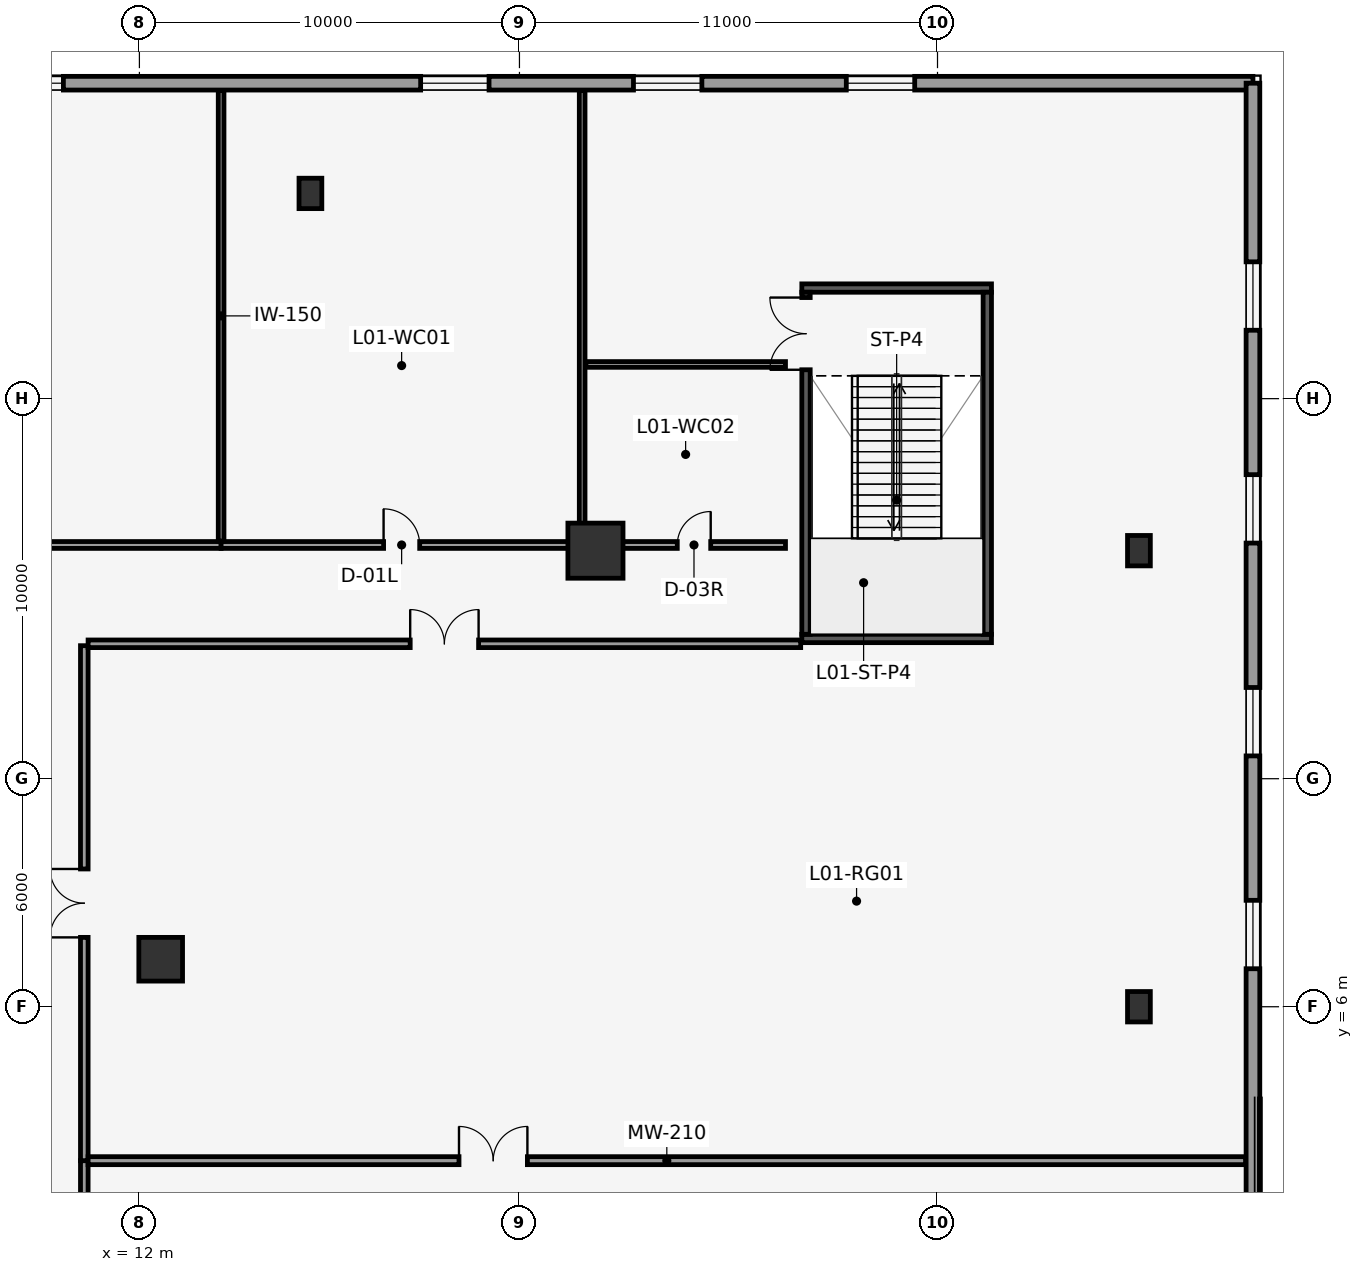
"""IFC4 building model, lengths in metres.
Left out: names, types, materials, properties, quantities, classifications, styles, units other than length and angle.
Written with IfcOpenShell. Run it as: python <this file> out.ifc"""

import sys

from ifc_helpers import new_model, si_unit, direction, frame, frame_2d, origin, origin_2d, place, context, subcontext, project, spatial, rectangle, hollow_rectangle, extrude, element, fill, save


model = new_model("IFC4")
c1 = context("Model", 3, precision=1e-05, world=origin(), true_north=direction((0.0, 1.0)))
c2 = subcontext(c1, "Body", "Model", "MODEL_VIEW")
j1 = project(units=[si_unit("LENGTHUNIT", "METRE"), si_unit("PLANEANGLEUNIT", "RADIAN")], contexts=[c1])
p1 = place(None, origin())
s1 = spatial("IfcSite", under=j1, at=p1, CompositionType="ELEMENT")
p2 = place(p1, origin())
s2 = spatial("IfcBuilding", under=s1, at=p2, CompositionType="ELEMENT")
p3 = place(p2, frame((0.0, 0.0, 6.0)))
s3 = spatial("IfcBuildingStorey", under=s2, at=p3, CompositionType="ELEMENT", Elevation=6.0)
p4 = place(p3, frame((12.56, 7.25, 0.0), z_axis=(0.0, 0.0, 1.0), x_axis=(1.0, 0.0, 0.0)))
e1 = element("IfcColumn", 1, at=p4, inside=s3, PredefinedType="COLUMN", context=c2, shape_type="SweptSolid", body=[
    extrude(rectangle(XDim=1.15, YDim=1.15, at=origin_2d()), origin(), (0.0, 0.0, 1.0), 5.5),
])
p5 = place(p3, frame((24.0, 18.0, 0.0), z_axis=(0.0, 0.0, 1.0), x_axis=(1.0, 0.0, 0.0)))
e2 = element("IfcColumn", 2, at=p5, inside=s3, PredefinedType="COLUMN", context=c2, shape_type="SweptSolid", body=[
    extrude(rectangle(XDim=1.45, YDim=1.45, at=origin_2d()), origin(), (0.0, 0.0, 1.0), 5.5),
])
for number, where, z_axis, x_axis in (
    (3, (38.3, 6.0, 0.0), (0.0, 0.0, 1.0), (1.0, 0.0, 0.0)),
    (4, (38.3, 18.0, 0.0), (0.0, 0.0, 1.0), (1.0, 0.0, 0.0)),
    (5, (16.5, 27.4, 0.0), (0.0, 0.0, 1.0), (1.0, 0.0, 0.0)),
):
    element("IfcColumn", number, at=place(p3, frame(where, z_axis=z_axis, x_axis=x_axis)), inside=s3, PredefinedType="COLUMN", context=c2, shape_type="SweptSolid", body=[
        extrude(hollow_rectangle(XDim=0.6, YDim=0.8, WallThickness=0.05, at=origin_2d()), origin(), (0.0, 0.0, 1.0), 5.5),
    ])
p6 = place(p3, frame((-41.3, 30.3, 0.0), z_axis=(0.0, 0.0, 1.0), x_axis=(1.0, 0.0, 0.0)))
e6 = element("IfcWall", 6, at=p6, inside=s3, PredefinedType="STANDARD", context=c2, shape_type="SweptSolid", body=[
    extrude(rectangle(XDim=82.6, YDim=0.36, at=frame_2d((41.3, 0.0))), origin(), (0.0, 0.0, 1.0), 5.2),
])
p7 = place(p6, frame((4.7, 0.0, 0.9)))
e7 = element("IfcOpeningElement", 7, at=p7, cuts=e6, PredefinedType="OPENING", context=c2, shape_type="SweptSolid", body=[
    extrude(rectangle(XDim=1.8, YDim=2.6, at=frame_2d((0.9, 1.3))), frame((0.0, 0.19, 0.0), z_axis=(0.0, -1.0, 0.0), x_axis=(1.0, 0.0, 0.0)), (0.0, 0.0, 1.0), 0.38),
])
p8 = place(p6, frame((10.3, 0.0, 0.9)))
e8 = element("IfcOpeningElement", 8, at=p8, cuts=e6, PredefinedType="OPENING", context=c2, shape_type="SweptSolid", body=[
    extrude(rectangle(XDim=1.8, YDim=2.6, at=frame_2d((0.9, 1.3))), frame((0.0, 0.19, 0.0), z_axis=(0.0, -1.0, 0.0), x_axis=(1.0, 0.0, 0.0)), (0.0, 0.0, 1.0), 0.38),
])
p9 = place(p6, frame((15.9, 0.0, 0.9)))
e9 = element("IfcOpeningElement", 9, at=p9, cuts=e6, PredefinedType="OPENING", context=c2, shape_type="SweptSolid", body=[
    extrude(rectangle(XDim=1.8, YDim=2.6, at=frame_2d((0.9, 1.3))), frame((0.0, 0.19, 0.0), z_axis=(0.0, -1.0, 0.0), x_axis=(1.0, 0.0, 0.0)), (0.0, 0.0, 1.0), 0.38),
])
p10 = place(p6, frame((21.5, 0.0, 0.9)))
e10 = element("IfcOpeningElement", 10, at=p10, cuts=e6, PredefinedType="OPENING", context=c2, shape_type="SweptSolid", body=[
    extrude(rectangle(XDim=1.8, YDim=2.6, at=frame_2d((0.9, 1.3))), frame((0.0, 0.19, 0.0), z_axis=(0.0, -1.0, 0.0), x_axis=(1.0, 0.0, 0.0)), (0.0, 0.0, 1.0), 0.38),
])
p11 = place(p6, frame((27.1, 0.0, 0.9)))
e11 = element("IfcOpeningElement", 11, at=p11, cuts=e6, PredefinedType="OPENING", context=c2, shape_type="SweptSolid", body=[
    extrude(rectangle(XDim=1.8, YDim=2.6, at=frame_2d((0.9, 1.3))), frame((0.0, 0.19, 0.0), z_axis=(0.0, -1.0, 0.0), x_axis=(1.0, 0.0, 0.0)), (0.0, 0.0, 1.0), 0.38),
])
p12 = place(p6, frame((49.5, 0.0, 0.9)))
e12 = element("IfcOpeningElement", 12, at=p12, cuts=e6, PredefinedType="OPENING", context=c2, shape_type="SweptSolid", body=[
    extrude(rectangle(XDim=1.8, YDim=2.6, at=frame_2d((0.9, 1.3))), frame((0.0, 0.19, 0.0), z_axis=(0.0, -1.0, 0.0), x_axis=(1.0, 0.0, 0.0)), (0.0, 0.0, 1.0), 0.38),
])
p13 = place(p6, frame((60.7, 0.0, 0.9)))
e13 = element("IfcOpeningElement", 13, at=p13, cuts=e6, PredefinedType="OPENING", context=c2, shape_type="SweptSolid", body=[
    extrude(rectangle(XDim=1.8, YDim=2.6, at=frame_2d((0.9, 1.3))), frame((0.0, 0.19, 0.0), z_axis=(0.0, -1.0, 0.0), x_axis=(1.0, 0.0, 0.0)), (0.0, 0.0, 1.0), 0.38),
])
p14 = place(p6, frame((66.3, 0.0, 0.9)))
e14 = element("IfcOpeningElement", 14, at=p14, cuts=e6, PredefinedType="OPENING", context=c2, shape_type="SweptSolid", body=[
    extrude(rectangle(XDim=1.8, YDim=2.6, at=frame_2d((0.9, 1.3))), frame((0.0, 0.19, 0.0), z_axis=(0.0, -1.0, 0.0), x_axis=(1.0, 0.0, 0.0)), (0.0, 0.0, 1.0), 0.38),
])
p15 = place(p6, frame((71.9, 0.0, 0.9)))
e15 = element("IfcOpeningElement", 15, at=p15, cuts=e6, PredefinedType="OPENING", context=c2, shape_type="SweptSolid", body=[
    extrude(rectangle(XDim=1.8, YDim=2.6, at=frame_2d((0.9, 1.3))), frame((0.0, 0.19, 0.0), z_axis=(0.0, -1.0, 0.0), x_axis=(1.0, 0.0, 0.0)), (0.0, 0.0, 1.0), 0.38),
])
p16 = place(p3, frame((41.3, 30.3, 0.0), z_axis=(0.0, 0.0, 1.0), x_axis=(0.0, -1.0, 0.0)))
e16 = element("IfcWall", 16, at=p16, inside=s3, PredefinedType="STANDARD", context=c2, shape_type="SweptSolid", body=[
    extrude(rectangle(XDim=60.6, YDim=0.36, at=frame_2d((30.3, 0.0))), origin(), (0.0, 0.0, 1.0), 5.2),
])
p17 = place(p16, frame((4.7, 0.0, 0.9)))
e17 = element("IfcOpeningElement", 17, at=p17, cuts=e16, PredefinedType="OPENING", context=c2, shape_type="SweptSolid", body=[
    extrude(rectangle(XDim=1.8, YDim=2.6, at=frame_2d((0.9, 1.3))), frame((0.0, 0.19, 0.0), z_axis=(0.0, -1.0, 0.0), x_axis=(1.0, 0.0, 0.0)), (0.0, 0.0, 1.0), 0.38),
])
p18 = place(p16, frame((10.3, 0.0, 0.9)))
e18 = element("IfcOpeningElement", 18, at=p18, cuts=e16, PredefinedType="OPENING", context=c2, shape_type="SweptSolid", body=[
    extrude(rectangle(XDim=1.8, YDim=2.6, at=frame_2d((0.9, 1.3))), frame((0.0, 0.19, 0.0), z_axis=(0.0, -1.0, 0.0), x_axis=(1.0, 0.0, 0.0)), (0.0, 0.0, 1.0), 0.38),
])
p19 = place(p16, frame((15.9, 0.0, 0.9)))
e19 = element("IfcOpeningElement", 19, at=p19, cuts=e16, PredefinedType="OPENING", context=c2, shape_type="SweptSolid", body=[
    extrude(rectangle(XDim=1.8, YDim=2.6, at=frame_2d((0.9, 1.3))), frame((0.0, 0.19, 0.0), z_axis=(0.0, -1.0, 0.0), x_axis=(1.0, 0.0, 0.0)), (0.0, 0.0, 1.0), 0.38),
])
p20 = place(p16, frame((21.5, 0.0, 0.9)))
e20 = element("IfcOpeningElement", 20, at=p20, cuts=e16, PredefinedType="OPENING", context=c2, shape_type="SweptSolid", body=[
    extrude(rectangle(XDim=1.8, YDim=2.6, at=frame_2d((0.9, 1.3))), frame((0.0, 0.19, 0.0), z_axis=(0.0, -1.0, 0.0), x_axis=(1.0, 0.0, 0.0)), (0.0, 0.0, 1.0), 0.38),
])
p21 = place(p16, frame((38.3, 0.0, 0.9)))
e21 = element("IfcOpeningElement", 21, at=p21, cuts=e16, PredefinedType="OPENING", context=c2, shape_type="SweptSolid", body=[
    extrude(rectangle(XDim=1.8, YDim=2.6, at=frame_2d((0.9, 1.3))), frame((0.0, 0.19, 0.0), z_axis=(0.0, -1.0, 0.0), x_axis=(1.0, 0.0, 0.0)), (0.0, 0.0, 1.0), 0.38),
])
p22 = place(p16, frame((43.9, 0.0, 0.9)))
e22 = element("IfcOpeningElement", 22, at=p22, cuts=e16, PredefinedType="OPENING", context=c2, shape_type="SweptSolid", body=[
    extrude(rectangle(XDim=1.8, YDim=2.6, at=frame_2d((0.9, 1.3))), frame((0.0, 0.19, 0.0), z_axis=(0.0, -1.0, 0.0), x_axis=(1.0, 0.0, 0.0)), (0.0, 0.0, 1.0), 0.38),
])
p23 = place(p16, frame((49.5, 0.0, 0.9)))
e23 = element("IfcOpeningElement", 23, at=p23, cuts=e16, PredefinedType="OPENING", context=c2, shape_type="SweptSolid", body=[
    extrude(rectangle(XDim=1.8, YDim=2.6, at=frame_2d((0.9, 1.3))), frame((0.0, 0.19, 0.0), z_axis=(0.0, -1.0, 0.0), x_axis=(1.0, 0.0, 0.0)), (0.0, 0.0, 1.0), 0.38),
])
for number, where, z_axis, x_axis in (
    (24, (29.43, 15.69, 0.0), (0.0, 0.0, 1.0), (1.0, 0.0, 0.0)),
    (25, (29.43, 24.91, 0.0), (0.0, 0.0, 1.0), (1.0, 0.0, 0.0)),
):
    element("IfcWall", number, at=place(p3, frame(where, z_axis=z_axis, x_axis=x_axis)), inside=s3, PredefinedType="SHEAR", context=c2, shape_type="SweptSolid", body=[
        extrude(rectangle(XDim=4.99, YDim=0.22, at=frame_2d((2.495, 0.0))), origin(), (0.0, 0.0, 1.0), 5.2),
    ])
p24 = place(p3, frame((29.54, 15.8, 0.0), z_axis=(0.0, 0.0, 1.0), x_axis=(0.0, 1.0, 0.0)))
e26 = element("IfcWall", 26, at=p24, inside=s3, PredefinedType="SHEAR", context=c2, shape_type="SweptSolid", body=[
    extrude(rectangle(XDim=9.0, YDim=0.22, at=frame_2d((4.5, 0.0))), origin(), (0.0, 0.0, 1.0), 5.2),
])
p25 = place(p24, frame((6.96, 0.0, 0.0)))
e27 = element("IfcOpeningElement", 27, at=p25, cuts=e26, PredefinedType="OPENING", context=c2, shape_type="SweptSolid", body=[
    extrude(rectangle(XDim=1.9, YDim=2.2, at=frame_2d((0.95, 1.1))), frame((0.0, 0.12, 0.0), z_axis=(0.0, -1.0, 0.0), x_axis=(1.0, 0.0, 0.0)), (0.0, 0.0, 1.0), 0.24),
])
p26 = place(p3, frame((34.31, 15.8, 0.0), z_axis=(0.0, 0.0, 1.0), x_axis=(0.0, 1.0, 0.0)))
e28 = element("IfcWall", 28, at=p26, inside=s3, PredefinedType="SHEAR", context=c2, shape_type="SweptSolid", body=[
    extrude(rectangle(XDim=9.0, YDim=0.22, at=frame_2d((4.5, 0.0))), origin(), (0.0, 0.0, 1.0), 5.2),
])
p27 = place(p3, frame((10.55, -15.5, 0.0), z_axis=(0.0, 0.0, 1.0), x_axis=(0.0, 1.0, 0.0)))
e29 = element("IfcWall", 29, at=p27, inside=s3, PredefinedType="PARTITIONING", context=c2, shape_type="SweptSolid", body=[
    extrude(rectangle(XDim=17.45, YDim=0.2, at=frame_2d((8.725, 0.0))), origin(), (0.0, 0.0, 1.0), 5.2),
])
p28 = place(p27, frame((7.825, 0.0, 0.0)))
e30 = element("IfcOpeningElement", 30, at=p28, cuts=e29, PredefinedType="OPENING", context=c2, shape_type="SweptSolid", body=[
    extrude(rectangle(XDim=1.8, YDim=2.2, at=frame_2d((0.9, 1.1))), frame((0.0, 0.11, 0.0), z_axis=(0.0, -1.0, 0.0), x_axis=(1.0, 0.0, 0.0)), (0.0, 0.0, 1.0), 0.22),
])
p29 = place(p3, frame((10.55, 1.95, 0.0), z_axis=(0.0, 0.0, 1.0), x_axis=(0.0, 1.0, 0.0)))
e31 = element("IfcWall", 31, at=p29, inside=s3, PredefinedType="PARTITIONING", context=c2, shape_type="SweptSolid", body=[
    extrude(rectangle(XDim=13.55, YDim=0.2, at=frame_2d((6.775, 0.0))), origin(), (0.0, 0.0, 1.0), 5.2),
])
p30 = place(p29, frame((5.875, 0.0, 0.0)))
e32 = element("IfcOpeningElement", 32, at=p30, cuts=e31, PredefinedType="OPENING", context=c2, shape_type="SweptSolid", body=[
    extrude(rectangle(XDim=1.8, YDim=2.2, at=frame_2d((0.9, 1.1))), frame((0.0, 0.11, 0.0), z_axis=(0.0, -1.0, 0.0), x_axis=(1.0, 0.0, 0.0)), (0.0, 0.0, 1.0), 0.22),
])
p31 = place(p3, frame((10.65, 1.95, 0.0), z_axis=(0.0, 0.0, 1.0), x_axis=(1.0, 0.0, 0.0)))
e33 = element("IfcWall", 33, at=p31, inside=s3, PredefinedType="MOVABLE", context=c2, shape_type="SweptSolid", body=[
    extrude(rectangle(XDim=30.455, YDim=0.21, at=frame_2d((15.228, 0.0))), origin(), (0.0, 0.0, 1.0), 5.2),
])
p32 = place(p31, frame((9.759, 0.0, 0.0)))
e34 = element("IfcOpeningElement", 34, at=p32, cuts=e33, PredefinedType="OPENING", context=c2, shape_type="SweptSolid", body=[
    extrude(rectangle(XDim=1.8, YDim=2.2, at=frame_2d((0.9, 1.1))), frame((0.0, 0.115, 0.0), z_axis=(0.0, -1.0, 0.0), x_axis=(1.0, 0.0, 0.0)), (0.0, 0.0, 1.0), 0.23),
])
p33 = place(p3, frame((10.65, 15.55, 0.0), z_axis=(0.0, 0.0, 1.0), x_axis=(1.0, 0.0, 0.0)))
e35 = element("IfcWall", 35, at=p33, inside=s3, PredefinedType="PARTITIONING", context=c2, shape_type="SweptSolid", body=[
    extrude(rectangle(XDim=18.75, YDim=0.2, at=frame_2d((9.375, 0.0))), origin(), (0.0, 0.0, 1.0), 5.2),
])
p34 = place(p33, frame((8.475, 0.0, 0.0)))
e36 = element("IfcOpeningElement", 36, at=p34, cuts=e35, PredefinedType="OPENING", context=c2, shape_type="SweptSolid", body=[
    extrude(rectangle(XDim=1.8, YDim=2.2, at=frame_2d((0.9, 1.1))), frame((0.0, 0.11, 0.0), z_axis=(0.0, -1.0, 0.0), x_axis=(1.0, 0.0, 0.0)), (0.0, 0.0, 1.0), 0.22),
])
p35 = place(p3, frame((-23.6, 18.15, 0.0), z_axis=(0.0, 0.0, 1.0), x_axis=(1.0, 0.0, 0.0)))
e37 = element("IfcWall", 37, at=p35, inside=s3, PredefinedType="PARTITIONING", context=c2, shape_type="SweptSolid", body=[
    extrude(rectangle(XDim=37.75, YDim=0.18, at=frame_2d((18.875, 0.0))), origin(), (0.0, 0.0, 1.0), 3.38),
])
p36 = place(p35, frame((10.425, 0.0, 0.0)))
e38 = element("IfcOpeningElement", 38, at=p36, cuts=e37, PredefinedType="OPENING", context=c2, shape_type="SweptSolid", body=[
    extrude(rectangle(XDim=1.8, YDim=2.2, at=frame_2d((0.9, 1.1))), frame((0.0, 0.1, 0.0), z_axis=(0.0, -1.0, 0.0), x_axis=(1.0, 0.0, 0.0)), (0.0, 0.0, 1.0), 0.2),
])
p37 = place(p3, frame((14.15, 18.15, 0.0), z_axis=(0.0, 0.0, 1.0), x_axis=(1.0, 0.0, 0.0)))
e39 = element("IfcWall", 39, at=p37, inside=s3, PredefinedType="PARTITIONING", context=c2, shape_type="SweptSolid", body=[
    extrude(rectangle(XDim=9.5, YDim=0.18, at=frame_2d((4.75, 0.0))), origin(), (0.0, 0.0, 1.0), 3.38),
])
p38 = place(p37, frame((4.275, 0.0, 0.0)))
e40 = element("IfcOpeningElement", 40, at=p38, cuts=e39, PredefinedType="OPENING", context=c2, shape_type="SweptSolid", body=[
    extrude(rectangle(XDim=0.95, YDim=2.15, at=frame_2d((0.475, 1.075))), frame((0.0, 0.1, 0.0), z_axis=(0.0, -1.0, 0.0), x_axis=(1.0, 0.0, 0.0)), (0.0, 0.0, 1.0), 0.2),
])
p39 = place(p3, frame((23.65, 18.15, 0.0), z_axis=(0.0, 0.0, 1.0), x_axis=(1.0, 0.0, 0.0)))
e41 = element("IfcWall", 41, at=p39, inside=s3, PredefinedType="PARTITIONING", context=c2, shape_type="SweptSolid", body=[
    extrude(rectangle(XDim=5.35, YDim=0.18, at=frame_2d((2.675, 0.0))), origin(), (0.0, 0.0, 1.0), 5.2),
])
p40 = place(p39, frame((2.502, 0.0, 0.0)))
e42 = element("IfcOpeningElement", 42, at=p40, cuts=e41, PredefinedType="OPENING", context=c2, shape_type="SweptSolid", body=[
    extrude(rectangle(XDim=0.88, YDim=2.1, at=frame_2d((0.44, 1.05))), frame((0.0, 0.1, 0.0), z_axis=(0.0, -1.0, 0.0), x_axis=(1.0, 0.0, 0.0)), (0.0, 0.0, 1.0), 0.2),
])
for number, where, z_axis, x_axis in (
    (43, (14.15, 18.25, 0.0), (0.0, 0.0, 1.0), (0.0, 1.0, 0.0)),
    (44, (23.65, 18.25, 0.0), (0.0, 0.0, 1.0), (0.0, 1.0, 0.0)),
):
    element("IfcWall", number, at=place(p3, frame(where, z_axis=z_axis, x_axis=x_axis)), inside=s3, PredefinedType="PARTITIONING", context=c2, shape_type="SweptSolid", body=[
        extrude(rectangle(XDim=11.855, YDim=0.15, at=frame_2d((5.927, 0.0))), origin(), (0.0, 0.0, 1.0), 5.2),
    ])
p41 = place(p3, frame((23.75, 22.9, 0.0), z_axis=(0.0, 0.0, 1.0), x_axis=(1.0, 0.0, 0.0)))
e45 = element("IfcWall", 45, at=p41, inside=s3, PredefinedType="PARTITIONING", context=c2, shape_type="SweptSolid", body=[
    extrude(rectangle(XDim=5.25, YDim=0.15, at=frame_2d((2.625, 0.0))), origin(), (0.0, 0.0, 1.0), 5.2),
])
p42 = place(p12, origin())
e46 = element("IfcWindow", 46, at=p42, inside=s3, PartitioningType="DOUBLE_PANEL_VERTICAL", PredefinedType="WINDOW", context=c2, shape_type="SweptSolid", body=[
    extrude(rectangle(XDim=1.8, YDim=2.6, at=frame_2d((0.9, 1.3))), frame((0.0, 0.03, 0.0), z_axis=(0.0, -1.0, 0.0), x_axis=(1.0, 0.0, 0.0)), (0.0, 0.0, 1.0), 0.06),
])
fill(e12, e46)
p43 = place(p13, origin())
e47 = element("IfcWindow", 47, at=p43, inside=s3, PartitioningType="DOUBLE_PANEL_VERTICAL", PredefinedType="WINDOW", context=c2, shape_type="SweptSolid", body=[
    extrude(rectangle(XDim=1.8, YDim=2.6, at=frame_2d((0.9, 1.3))), frame((0.0, 0.03, 0.0), z_axis=(0.0, -1.0, 0.0), x_axis=(1.0, 0.0, 0.0)), (0.0, 0.0, 1.0), 0.06),
])
fill(e13, e47)
p44 = place(p14, origin())
e48 = element("IfcWindow", 48, at=p44, inside=s3, PartitioningType="DOUBLE_PANEL_VERTICAL", PredefinedType="WINDOW", context=c2, shape_type="SweptSolid", body=[
    extrude(rectangle(XDim=1.8, YDim=2.6, at=frame_2d((0.9, 1.3))), frame((0.0, 0.03, 0.0), z_axis=(0.0, -1.0, 0.0), x_axis=(1.0, 0.0, 0.0)), (0.0, 0.0, 1.0), 0.06),
])
fill(e14, e48)
p45 = place(p15, origin())
e49 = element("IfcWindow", 49, at=p45, inside=s3, PartitioningType="DOUBLE_PANEL_VERTICAL", PredefinedType="WINDOW", context=c2, shape_type="SweptSolid", body=[
    extrude(rectangle(XDim=1.8, YDim=2.6, at=frame_2d((0.9, 1.3))), frame((0.0, 0.03, 0.0), z_axis=(0.0, -1.0, 0.0), x_axis=(1.0, 0.0, 0.0)), (0.0, 0.0, 1.0), 0.06),
])
fill(e15, e49)
p46 = place(p17, origin())
e50 = element("IfcWindow", 50, at=p46, inside=s3, PartitioningType="DOUBLE_PANEL_VERTICAL", PredefinedType="WINDOW", context=c2, shape_type="SweptSolid", body=[
    extrude(rectangle(XDim=1.8, YDim=2.6, at=frame_2d((0.9, 1.3))), frame((0.0, 0.03, 0.0), z_axis=(0.0, -1.0, 0.0), x_axis=(1.0, 0.0, 0.0)), (0.0, 0.0, 1.0), 0.06),
])
fill(e17, e50)
p47 = place(p18, origin())
e51 = element("IfcWindow", 51, at=p47, inside=s3, PartitioningType="DOUBLE_PANEL_VERTICAL", PredefinedType="WINDOW", context=c2, shape_type="SweptSolid", body=[
    extrude(rectangle(XDim=1.8, YDim=2.6, at=frame_2d((0.9, 1.3))), frame((0.0, 0.03, 0.0), z_axis=(0.0, -1.0, 0.0), x_axis=(1.0, 0.0, 0.0)), (0.0, 0.0, 1.0), 0.06),
])
fill(e18, e51)
p48 = place(p19, origin())
e52 = element("IfcWindow", 52, at=p48, inside=s3, PartitioningType="DOUBLE_PANEL_VERTICAL", PredefinedType="WINDOW", context=c2, shape_type="SweptSolid", body=[
    extrude(rectangle(XDim=1.8, YDim=2.6, at=frame_2d((0.9, 1.3))), frame((0.0, 0.03, 0.0), z_axis=(0.0, -1.0, 0.0), x_axis=(1.0, 0.0, 0.0)), (0.0, 0.0, 1.0), 0.06),
])
fill(e19, e52)
p49 = place(p20, origin())
e53 = element("IfcWindow", 53, at=p49, inside=s3, PartitioningType="DOUBLE_PANEL_VERTICAL", PredefinedType="WINDOW", context=c2, shape_type="SweptSolid", body=[
    extrude(rectangle(XDim=1.8, YDim=2.6, at=frame_2d((0.9, 1.3))), frame((0.0, 0.03, 0.0), z_axis=(0.0, -1.0, 0.0), x_axis=(1.0, 0.0, 0.0)), (0.0, 0.0, 1.0), 0.06),
])
fill(e20, e53)
p50 = place(p25, origin())
e54 = element("IfcDoor", 54, at=p50, inside=s3, OperationType="DOUBLE_DOOR_SINGLE_SWING", PredefinedType="DOOR", context=c2, shape_type="SweptSolid", body=[
    extrude(rectangle(XDim=1.9, YDim=2.2, at=frame_2d((0.95, 1.1))), frame((0.0, 0.025, 0.0), z_axis=(0.0, -1.0, 0.0), x_axis=(1.0, 0.0, 0.0)), (0.0, 0.0, 1.0), 0.05),
])
fill(e27, e54)
p51 = place(p30, origin())
e55 = element("IfcDoor", 55, at=p51, inside=s3, OperationType="DOUBLE_DOOR_SINGLE_SWING", PredefinedType="DOOR", context=c2, shape_type="SweptSolid", body=[
    extrude(rectangle(XDim=1.8, YDim=2.2, at=frame_2d((0.9, 1.1))), frame((0.0, 0.025, 0.0), z_axis=(0.0, -1.0, 0.0), x_axis=(1.0, 0.0, 0.0)), (0.0, 0.0, 1.0), 0.05),
])
fill(e32, e55)
p52 = place(p32, origin())
e56 = element("IfcDoor", 56, at=p52, inside=s3, OperationType="DOUBLE_DOOR_SINGLE_SWING", PredefinedType="DOOR", context=c2, shape_type="SweptSolid", body=[
    extrude(rectangle(XDim=1.8, YDim=2.2, at=frame_2d((0.9, 1.1))), frame((0.0, 0.025, 0.0), z_axis=(0.0, -1.0, 0.0), x_axis=(1.0, 0.0, 0.0)), (0.0, 0.0, 1.0), 0.05),
])
fill(e34, e56)
p53 = place(p34, origin())
e57 = element("IfcDoor", 57, at=p53, inside=s3, OperationType="DOUBLE_DOOR_SINGLE_SWING", PredefinedType="DOOR", context=c2, shape_type="SweptSolid", body=[
    extrude(rectangle(XDim=1.8, YDim=2.2, at=frame_2d((0.9, 1.1))), frame((0.0, 0.025, 0.0), z_axis=(0.0, -1.0, 0.0), x_axis=(1.0, 0.0, 0.0)), (0.0, 0.0, 1.0), 0.05),
])
fill(e36, e57)
p54 = place(p38, origin())
e58 = element("IfcDoor", 58, at=p54, inside=s3, OperationType="SINGLE_SWING_LEFT", PredefinedType="DOOR", context=c2, shape_type="SweptSolid", body=[
    extrude(rectangle(XDim=0.95, YDim=2.15, at=frame_2d((0.475, 1.075))), frame((0.0, 0.025, 0.0), z_axis=(0.0, -1.0, 0.0), x_axis=(1.0, 0.0, 0.0)), (0.0, 0.0, 1.0), 0.05),
])
fill(e40, e58)
p55 = place(p40, origin())
e59 = element("IfcDoor", 59, at=p55, inside=s3, OperationType="SINGLE_SWING_RIGHT", PredefinedType="DOOR", context=c2, shape_type="SweptSolid", body=[
    extrude(rectangle(XDim=0.88, YDim=2.1, at=frame_2d((0.44, 1.05))), frame((0.0, 0.025, 0.0), z_axis=(0.0, -1.0, 0.0), x_axis=(1.0, 0.0, 0.0)), (0.0, 0.0, 1.0), 0.05),
])
fill(e42, e59)
save(model, sys.argv[1])
